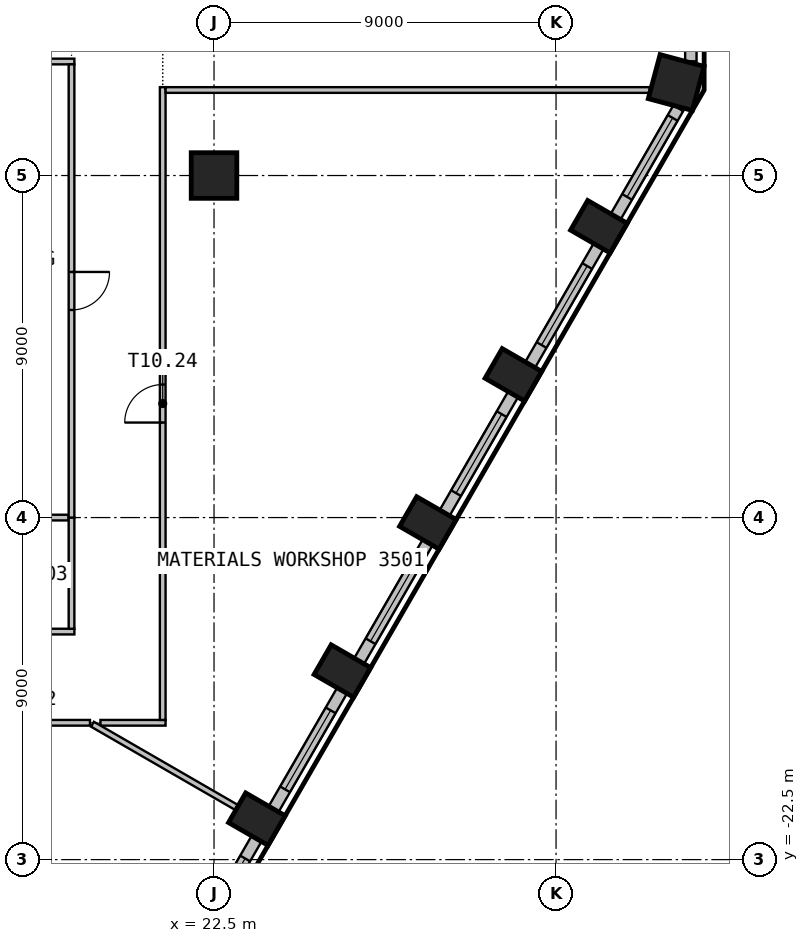
"""IFC4 building model, lengths in metres.
Left out: names, types, materials, properties, quantities, classifications, styles, units other than length and angle.
Written with IfcOpenShell. Run it as: python <this file> out.ifc"""

import sys

from ifc_helpers import new_model, si_unit, direction, frame, frame_2d, origin, origin_2d, place, context, subcontext, project, spatial, rectangle, circle, extrude, element, fill, save


model = new_model("IFC4")
c1 = context("Model", 3, precision=1e-05, world=origin(), true_north=direction((0.0, 1.0)))
c2 = subcontext(c1, "Body", "Model", "MODEL_VIEW")
j1 = project(units=[si_unit("LENGTHUNIT", "METRE"), si_unit("PLANEANGLEUNIT", "RADIAN")], contexts=[c1])
p1 = place(None, origin())
s1 = spatial("IfcSite", under=j1, at=p1, CompositionType="ELEMENT")
p2 = place(p1, origin())
s2 = spatial("IfcBuilding", under=s1, at=p2, CompositionType="ELEMENT")
p3 = place(p2, frame((0.0, 0.0, 144.3)))
s3 = spatial("IfcBuildingStorey", under=s2, at=p3, CompositionType="ELEMENT", Elevation=144.3)
for number, where, z_axis, x_axis in (
    (1, (23.627, -21.436, 0.0), (0.0, 0.0, 1.0), (0.5, 0.866, 0.0)),
    (2, (25.877, -17.539, 0.0), (0.0, 0.0, 1.0), (0.5, 0.866, 0.0)),
    (3, (28.127, -13.641, 0.0), (0.0, 0.0, 1.0), (0.5, 0.866, 0.0)),
    (4, (30.377, -9.744, 0.0), (0.0, 0.0, 1.0), (0.5, 0.866, 0.0)),
    (5, (32.627, -5.847, 0.0), (0.0, 0.0, 1.0), (0.5, 0.866, 0.0)),
):
    element("IfcColumn", number, at=place(p3, frame(where, z_axis=z_axis, x_axis=x_axis)), inside=s3, PredefinedType="COLUMN", context=c2, shape_type="SweptSolid", body=[
        extrude(rectangle(XDim=0.9, YDim=1.2, at=origin_2d()), origin(), (0.0, 0.0, 1.0), 3.575),
    ])
p4 = place(p3, frame((34.662, -2.053, 0.0), z_axis=(0.0, 0.0, 1.0), x_axis=(0.258819045103, 0.965925826289, 0.0)))
e6 = element("IfcColumn", 6, at=p4, inside=s3, PredefinedType="COLUMN", context=c2, shape_type="SweptSolid", body=[
    extrude(rectangle(XDim=1.2, YDim=1.2, at=origin_2d()), origin(), (0.0, 0.0, 1.0), 3.575),
])
p5 = place(p3, frame((22.5, -4.5, 0.0), z_axis=(0.0, 0.0, 1.0), x_axis=(1.0, 0.0, 0.0)))
e7 = element("IfcColumn", 7, at=p5, inside=s3, PredefinedType="COLUMN", context=c2, shape_type="SweptSolid", body=[
    extrude(circle(Radius=0.6, at=origin_2d()), origin(), (0.0, 0.0, 1.0), 3.575),
])
p6 = place(p3, frame((21.972, -24.803, 0.0), z_axis=(0.0, 0.0, 1.0), x_axis=(0.500036802197, 0.866004154983, 0.0)))
e8 = element("IfcWall", 8, at=p6, inside=s3, PredefinedType="SOLIDWALL", context=c2, shape_type="SweptSolid", body=[
    extrude(rectangle(XDim=3.294, YDim=0.3, at=frame_2d((1.647, 0.0))), origin(), (0.0, 0.0, 1.0), 3.575),
])
p7 = place(p6, frame((0.294, 0.0, 0.9)))
e9 = element("IfcOpeningElement", 9, at=p7, cuts=e8, PredefinedType="OPENING", context=c2, shape_type="SweptSolid", body=[
    extrude(rectangle(XDim=2.4, YDim=2.1, at=frame_2d((1.2, 1.05))), frame((0.0, 0.16, 0.0), z_axis=(0.0, -1.0, 0.0), x_axis=(1.0, 0.0, 0.0)), (0.0, 0.0, 1.0), 0.32),
])
p8 = place(p3, frame((24.069, -21.17, 0.0), z_axis=(0.0, 0.0, 1.0), x_axis=(0.500027802648, 0.866009351323, 0.0)))
e10 = element("IfcWall", 10, at=p8, inside=s3, PredefinedType="SOLIDWALL", context=c2, shape_type="SweptSolid", body=[
    extrude(rectangle(XDim=3.599, YDim=0.3, at=frame_2d((1.799, 0.0))), origin(), (0.0, 0.0, 1.0), 3.575),
])
p9 = place(p8, frame((0.6, 0.0, 0.9)))
e11 = element("IfcOpeningElement", 11, at=p9, cuts=e10, PredefinedType="OPENING", context=c2, shape_type="SweptSolid", body=[
    extrude(rectangle(XDim=2.4, YDim=2.1, at=frame_2d((1.2, 1.05))), frame((0.0, 0.16, 0.0), z_axis=(0.0, -1.0, 0.0), x_axis=(1.0, 0.0, 0.0)), (0.0, 0.0, 1.0), 0.32),
])
p10 = place(p3, frame((26.319, -17.273, 0.0), z_axis=(0.0, 0.0, 1.0), x_axis=(0.500027802648, 0.866009351323, 0.0)))
e12 = element("IfcWall", 12, at=p10, inside=s3, PredefinedType="SOLIDWALL", context=c2, shape_type="SweptSolid", body=[
    extrude(rectangle(XDim=3.599, YDim=0.3, at=frame_2d((1.799, 0.0))), origin(), (0.0, 0.0, 1.0), 3.575),
])
p11 = place(p10, frame((0.6, 0.0, 0.9)))
e13 = element("IfcOpeningElement", 13, at=p11, cuts=e12, PredefinedType="OPENING", context=c2, shape_type="SweptSolid", body=[
    extrude(rectangle(XDim=2.4, YDim=2.1, at=frame_2d((1.2, 1.05))), frame((0.0, 0.16, 0.0), z_axis=(0.0, -1.0, 0.0), x_axis=(1.0, 0.0, 0.0)), (0.0, 0.0, 1.0), 0.32),
])
p12 = place(p3, frame((28.569, -13.376, 0.0), z_axis=(0.0, 0.0, 1.0), x_axis=(0.500027802648, 0.866009351323, 0.0)))
e14 = element("IfcWall", 14, at=p12, inside=s3, PredefinedType="SOLIDWALL", context=c2, shape_type="SweptSolid", body=[
    extrude(rectangle(XDim=3.599, YDim=0.3, at=frame_2d((1.799, 0.0))), origin(), (0.0, 0.0, 1.0), 3.575),
])
p13 = place(p12, frame((0.6, 0.0, 0.9)))
e15 = element("IfcOpeningElement", 15, at=p13, cuts=e14, PredefinedType="OPENING", context=c2, shape_type="SweptSolid", body=[
    extrude(rectangle(XDim=2.4, YDim=2.1, at=frame_2d((1.2, 1.05))), frame((0.0, 0.16, 0.0), z_axis=(0.0, -1.0, 0.0), x_axis=(1.0, 0.0, 0.0)), (0.0, 0.0, 1.0), 0.32),
])
p14 = place(p3, frame((30.819, -9.479, 0.0), z_axis=(0.0, 0.0, 1.0), x_axis=(0.500027802648, 0.866009351323, 0.0)))
e16 = element("IfcWall", 16, at=p14, inside=s3, PredefinedType="SOLIDWALL", context=c2, shape_type="SweptSolid", body=[
    extrude(rectangle(XDim=3.599, YDim=0.3, at=frame_2d((1.799, 0.0))), origin(), (0.0, 0.0, 1.0), 3.575),
])
p15 = place(p14, frame((0.6, 0.0, 0.9)))
e17 = element("IfcOpeningElement", 17, at=p15, cuts=e16, PredefinedType="OPENING", context=c2, shape_type="SweptSolid", body=[
    extrude(rectangle(XDim=2.4, YDim=2.1, at=frame_2d((1.2, 1.05))), frame((0.0, 0.16, 0.0), z_axis=(0.0, -1.0, 0.0), x_axis=(1.0, 0.0, 0.0)), (0.0, 0.0, 1.0), 0.32),
])
p16 = place(p3, frame((33.069, -5.582, 0.0), z_axis=(0.0, 0.0, 1.0), x_axis=(0.499981217486, 0.866036247602, 0.0)))
e18 = element("IfcWall", 18, at=p16, inside=s3, PredefinedType="SOLIDWALL", context=c2, shape_type="SweptSolid", body=[
    extrude(rectangle(XDim=3.294, YDim=0.3, at=frame_2d((1.647, 0.0))), origin(), (0.0, 0.0, 1.0), 3.575),
])
p17 = place(p16, frame((0.6, 0.0, 0.9)))
e19 = element("IfcOpeningElement", 19, at=p17, cuts=e18, PredefinedType="OPENING", context=c2, shape_type="SweptSolid", body=[
    extrude(rectangle(XDim=2.4, YDim=2.1, at=frame_2d((1.2, 1.05))), frame((0.0, 0.16, 0.0), z_axis=(0.0, -1.0, 0.0), x_axis=(1.0, 0.0, 0.0)), (0.0, 0.0, 1.0), 0.32),
])
p18 = place(p3, frame((35.047, -1.495, 0.0), z_axis=(0.0, 0.0, 1.0), x_axis=(0.0, 1.0, 0.0)))
e20 = element("IfcWall", 20, at=p18, inside=s3, PredefinedType="SOLIDWALL", context=c2, shape_type="SweptSolid", body=[
    extrude(rectangle(XDim=2.989, YDim=0.3, at=frame_2d((1.495, 0.0))), origin(), (0.0, 0.0, 1.0), 3.575),
])
p19 = place(p18, frame((0.295, 0.0, 0.9)))
e21 = element("IfcOpeningElement", 21, at=p19, cuts=e20, PredefinedType="OPENING", context=c2, shape_type="SweptSolid", body=[
    extrude(rectangle(XDim=2.4, YDim=2.1, at=frame_2d((1.2, 1.05))), frame((0.0, 0.16, 0.0), z_axis=(0.0, -1.0, 0.0), x_axis=(1.0, 0.0, 0.0)), (0.0, 0.0, 1.0), 0.32),
])
p20 = place(p3, frame((18.825, -16.5, 0.0), z_axis=(0.0, 0.0, 1.0), x_axis=(-1.0, 0.0, 0.0)))
e22 = element("IfcWall", 22, at=p20, inside=s3, PredefinedType="PARTITIONING", context=c2, shape_type="SweptSolid", body=[
    extrude(rectangle(XDim=5.4, YDim=0.15, at=frame_2d((2.7, 0.0))), origin(), (0.0, 0.0, 1.0), 3.575),
])
p21 = place(p20, frame((2.2, 0.0, 0.0)))
e23 = element("IfcOpeningElement", 23, at=p21, cuts=e22, PredefinedType="OPENING", context=c2, shape_type="SweptSolid", body=[
    extrude(rectangle(XDim=1.0, YDim=2.1, at=frame_2d((0.5, 1.05))), frame((0.0, 0.085, 0.0), z_axis=(0.0, -1.0, 0.0), x_axis=(1.0, 0.0, 0.0)), (0.0, 0.0, 1.0), 0.17),
])
p22 = place(p3, frame((15.688, -18.9, 0.0), z_axis=(0.0, 0.0, 1.0), x_axis=(1.0, 0.0, 0.0)))
e24 = element("IfcWall", 24, at=p22, inside=s3, PredefinedType="PARTITIONING", context=c2, shape_type="SweptSolid", body=[
    extrude(rectangle(XDim=3.548, YDim=0.15, at=frame_2d((1.774, 0.0))), origin(), (0.0, 0.0, 1.0), 3.575),
])
p23 = place(p22, frame((1.274, 0.0, 0.0)))
e25 = element("IfcOpeningElement", 25, at=p23, cuts=e24, PredefinedType="OPENING", context=c2, shape_type="SweptSolid", body=[
    extrude(rectangle(XDim=1.0, YDim=2.1, at=frame_2d((0.5, 1.05))), frame((0.0, 0.085, 0.0), z_axis=(0.0, -1.0, 0.0), x_axis=(1.0, 0.0, 0.0)), (0.0, 0.0, 1.0), 0.17),
])
p24 = place(p3, frame((15.75, -13.5, 0.0), z_axis=(0.0, 0.0, 1.0), x_axis=(1.0, 0.0, 0.0)))
e26 = element("IfcWall", 26, at=p24, inside=s3, PredefinedType="PARTITIONING", context=c2, shape_type="SweptSolid", body=[
    extrude(rectangle(XDim=2.925, YDim=0.15, at=frame_2d((1.462, 0.0))), origin(), (0.0, 0.0, 1.0), 3.575),
])
p25 = place(p3, frame((15.75, -1.5, 0.0), z_axis=(0.0, 0.0, 1.0), x_axis=(1.0, 0.0, 0.0)))
e27 = element("IfcWall", 27, at=p25, inside=s3, PredefinedType="PARTITIONING", context=c2, shape_type="SweptSolid", body=[
    extrude(rectangle(XDim=3.075, YDim=0.15, at=frame_2d((1.538, 0.0))), origin(), (0.0, 0.0, 1.0), 3.575),
])
p26 = place(p3, frame((18.75, -13.5, 0.0), z_axis=(0.0, 0.0, 1.0), x_axis=(0.0, -1.0, 0.0)))
e28 = element("IfcWall", 28, at=p26, inside=s3, PredefinedType="PARTITIONING", context=c2, shape_type="SweptSolid", body=[
    extrude(rectangle(XDim=2.925, YDim=0.15, at=frame_2d((1.462, 0.0))), origin(), (0.0, 0.0, 1.0), 3.575),
])
p27 = place(p3, frame((18.75, -1.575, 0.0), z_axis=(0.0, 0.0, 1.0), x_axis=(0.0, -1.0, 0.0)))
e29 = element("IfcWall", 29, at=p27, inside=s3, PredefinedType="PARTITIONING", context=c2, shape_type="SweptSolid", body=[
    extrude(rectangle(XDim=11.925, YDim=0.15, at=frame_2d((5.962, 0.0))), origin(), (0.0, 0.0, 1.0), 3.575),
])
p28 = place(p27, frame((5.462, 0.0, 0.0)))
e30 = element("IfcOpeningElement", 30, at=p28, cuts=e29, PredefinedType="OPENING", context=c2, shape_type="SweptSolid", body=[
    extrude(rectangle(XDim=1.0, YDim=2.1, at=frame_2d((0.5, 1.05))), frame((0.0, 0.085, 0.0), z_axis=(0.0, -1.0, 0.0), x_axis=(1.0, 0.0, 0.0)), (0.0, 0.0, 1.0), 0.17),
])
p29 = place(p3, frame((19.511, -18.9, 0.0), z_axis=(0.0, 0.0, 1.0), x_axis=(1.0, 0.0, 0.0)))
e31 = element("IfcWall", 31, at=p29, inside=s3, PredefinedType="PARTITIONING", context=c2, shape_type="SweptSolid", body=[
    extrude(rectangle(XDim=1.714, YDim=0.15, at=frame_2d((0.857, 0.0))), origin(), (0.0, 0.0, 1.0), 3.575),
])
p30 = place(p3, frame((19.301, -18.938, 0.0), z_axis=(0.0, 0.0, 1.0), x_axis=(0.865968165673, -0.500099126214, 0.0)))
e32 = element("IfcWall", 32, at=p30, inside=s3, PredefinedType="PARTITIONING", context=c2, shape_type="SweptSolid", body=[
    extrude(rectangle(XDim=4.376, YDim=0.15, at=frame_2d((2.188, 0.0))), origin(), (0.0, 0.0, 1.0), 3.575),
])
p31 = place(p3, frame((21.15, -18.825, 0.0), z_axis=(0.0, 0.0, 1.0), x_axis=(0.0, 1.0, 0.0)))
e33 = element("IfcWall", 33, at=p31, inside=s3, PredefinedType="PARTITIONING", context=c2, shape_type="SweptSolid", body=[
    extrude(rectangle(XDim=16.65, YDim=0.15, at=frame_2d((8.325, 0.0))), origin(), (0.0, 0.0, 1.0), 3.575),
])
p32 = place(p31, frame((7.825, 0.0, 0.0)))
e34 = element("IfcOpeningElement", 34, at=p32, cuts=e33, PredefinedType="OPENING", context=c2, shape_type="SweptSolid", body=[
    extrude(rectangle(XDim=1.0, YDim=2.1, at=frame_2d((0.5, 1.05))), frame((0.0, 0.085, 0.0), z_axis=(0.0, -1.0, 0.0), x_axis=(1.0, 0.0, 0.0)), (0.0, 0.0, 1.0), 0.17),
])
p33 = place(p3, frame((33.968, -2.25, 0.0), z_axis=(0.0, 0.0, 1.0), x_axis=(-1.0, 0.0, 0.0)))
e35 = element("IfcWall", 35, at=p33, inside=s3, PredefinedType="PARTITIONING", context=c2, shape_type="SweptSolid", body=[
    extrude(rectangle(XDim=12.743, YDim=0.15, at=frame_2d((6.371, 0.0))), origin(), (0.0, 0.0, 1.0), 3.575),
])
p34 = place(p7, origin())
e36 = element("IfcWindow", 36, at=p34, inside=s3, PartitioningType="SINGLE_PANEL", PredefinedType="WINDOW", context=c2, shape_type="SweptSolid", body=[
    extrude(rectangle(XDim=2.4, YDim=2.1, at=frame_2d((1.2, 1.05))), frame((0.0, 0.03, 0.0), z_axis=(0.0, -1.0, 0.0), x_axis=(1.0, 0.0, 0.0)), (0.0, 0.0, 1.0), 0.06),
])
fill(e9, e36)
p35 = place(p9, origin())
e37 = element("IfcWindow", 37, at=p35, inside=s3, PartitioningType="SINGLE_PANEL", PredefinedType="WINDOW", context=c2, shape_type="SweptSolid", body=[
    extrude(rectangle(XDim=2.4, YDim=2.1, at=frame_2d((1.2, 1.05))), frame((0.0, 0.03, 0.0), z_axis=(0.0, -1.0, 0.0), x_axis=(1.0, 0.0, 0.0)), (0.0, 0.0, 1.0), 0.06),
])
fill(e11, e37)
p36 = place(p11, origin())
e38 = element("IfcWindow", 38, at=p36, inside=s3, PartitioningType="SINGLE_PANEL", PredefinedType="WINDOW", context=c2, shape_type="SweptSolid", body=[
    extrude(rectangle(XDim=2.4, YDim=2.1, at=frame_2d((1.2, 1.05))), frame((0.0, 0.03, 0.0), z_axis=(0.0, -1.0, 0.0), x_axis=(1.0, 0.0, 0.0)), (0.0, 0.0, 1.0), 0.06),
])
fill(e13, e38)
p37 = place(p13, origin())
e39 = element("IfcWindow", 39, at=p37, inside=s3, PartitioningType="SINGLE_PANEL", PredefinedType="WINDOW", context=c2, shape_type="SweptSolid", body=[
    extrude(rectangle(XDim=2.4, YDim=2.1, at=frame_2d((1.2, 1.05))), frame((0.0, 0.03, 0.0), z_axis=(0.0, -1.0, 0.0), x_axis=(1.0, 0.0, 0.0)), (0.0, 0.0, 1.0), 0.06),
])
fill(e15, e39)
p38 = place(p15, origin())
e40 = element("IfcWindow", 40, at=p38, inside=s3, PartitioningType="SINGLE_PANEL", PredefinedType="WINDOW", context=c2, shape_type="SweptSolid", body=[
    extrude(rectangle(XDim=2.4, YDim=2.1, at=frame_2d((1.2, 1.05))), frame((0.0, 0.03, 0.0), z_axis=(0.0, -1.0, 0.0), x_axis=(1.0, 0.0, 0.0)), (0.0, 0.0, 1.0), 0.06),
])
fill(e17, e40)
p39 = place(p17, origin())
e41 = element("IfcWindow", 41, at=p39, inside=s3, PartitioningType="SINGLE_PANEL", PredefinedType="WINDOW", context=c2, shape_type="SweptSolid", body=[
    extrude(rectangle(XDim=2.4, YDim=2.1, at=frame_2d((1.2, 1.05))), frame((0.0, 0.03, 0.0), z_axis=(0.0, -1.0, 0.0), x_axis=(1.0, 0.0, 0.0)), (0.0, 0.0, 1.0), 0.06),
])
fill(e19, e41)
p40 = place(p28, origin())
e42 = element("IfcDoor", 42, at=p40, inside=s3, OperationType="SINGLE_SWING_LEFT", PredefinedType="DOOR", context=c2, shape_type="SweptSolid", body=[
    extrude(rectangle(XDim=1.0, YDim=2.1, at=frame_2d((0.5, 1.05))), frame((0.0, 0.025, 0.0), z_axis=(0.0, -1.0, 0.0), x_axis=(1.0, 0.0, 0.0)), (0.0, 0.0, 1.0), 0.05),
])
fill(e30, e42)
p41 = place(p32, origin())
e43 = element("IfcDoor", 43, at=p41, inside=s3, OperationType="SINGLE_SWING_RIGHT", PredefinedType="DOOR", context=c2, shape_type="SweptSolid", body=[
    extrude(rectangle(XDim=1.0, YDim=2.1, at=frame_2d((0.5, 1.05))), frame((0.0, 0.025, 0.0), z_axis=(0.0, -1.0, 0.0), x_axis=(1.0, 0.0, 0.0)), (0.0, 0.0, 1.0), 0.05),
])
fill(e34, e43)
save(model, sys.argv[1])
